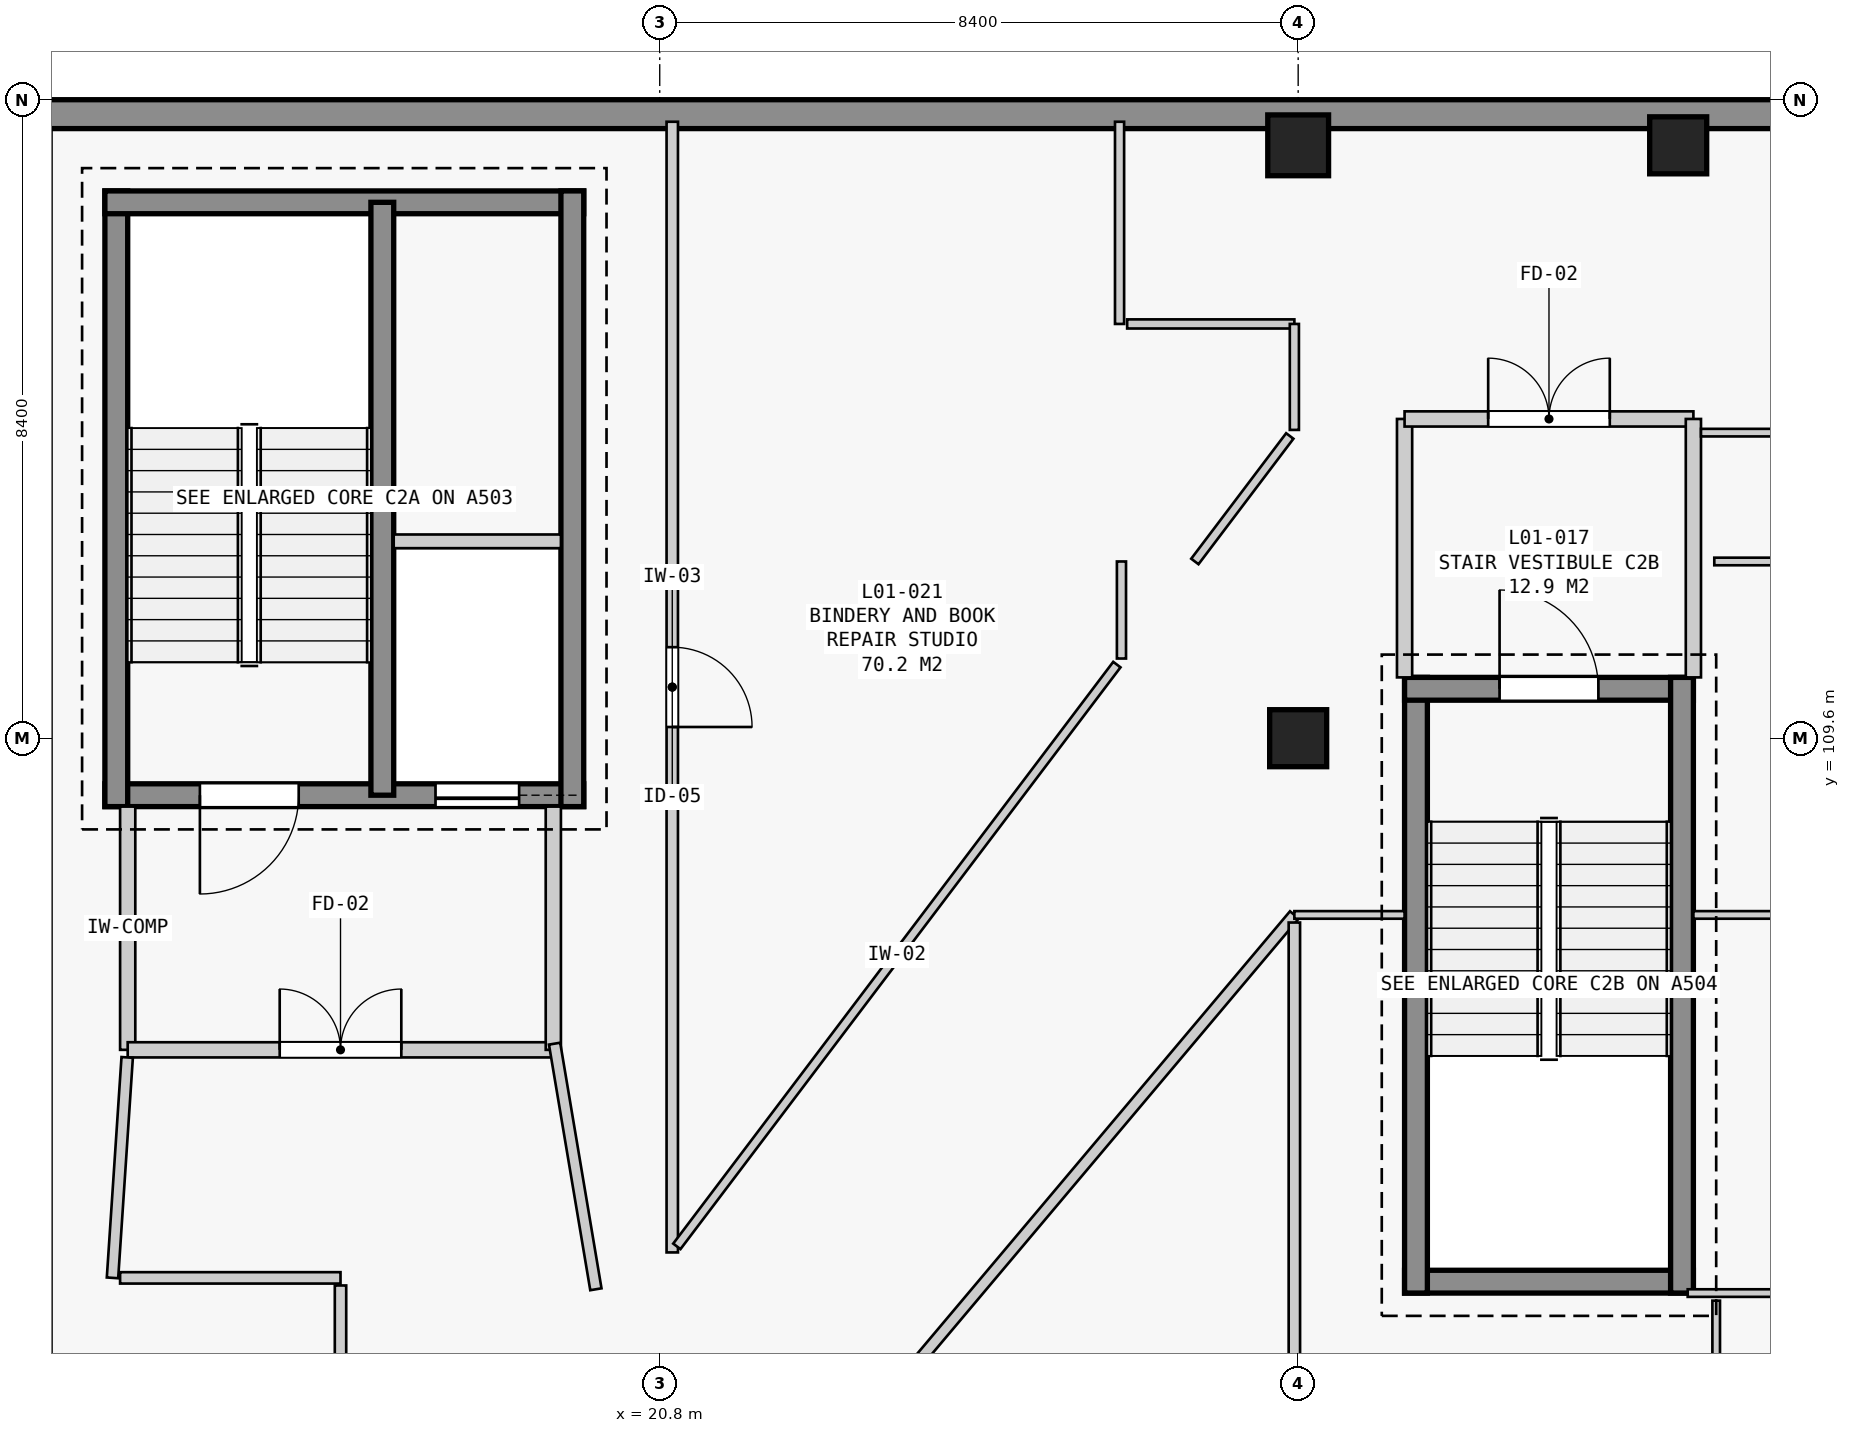
"""IFC4 building model, lengths in metres.
Left out: names, types, materials, properties, quantities, classifications, styles, units other than length and angle.
Written with IfcOpenShell. Run it as: python <this file> out.ifc"""

import sys

from ifc_helpers import new_model, si_unit, direction, frame, frame_2d, origin, origin_2d, place, context, subcontext, project, spatial, rectangle, extrude, element, fill, save


model = new_model("IFC4")
c1 = context("Model", 3, precision=1e-05, world=origin(), true_north=direction((0.0, 1.0)))
c2 = subcontext(c1, "Body", "Model", "MODEL_VIEW")
j1 = project(units=[si_unit("LENGTHUNIT", "METRE"), si_unit("PLANEANGLEUNIT", "RADIAN")], contexts=[c1])
p1 = place(None, origin())
s1 = spatial("IfcSite", under=j1, at=p1, CompositionType="ELEMENT")
p2 = place(p1, origin())
s2 = spatial("IfcBuilding", under=s1, at=p2, CompositionType="ELEMENT")
p3 = place(p2, frame((0.0, 0.0, 5.4)))
s3 = spatial("IfcBuildingStorey", under=s2, at=p3, CompositionType="ELEMENT", Elevation=5.4)
p4 = place(p3, frame((29.2, 109.6, 0.0), z_axis=(0.0, 0.0, 1.0), x_axis=(1.0, 0.0, 0.0)))
e1 = element("IfcColumn", 1, at=p4, inside=s3, PredefinedType="COLUMN", context=c2, shape_type="SweptSolid", body=[
    extrude(rectangle(XDim=0.75, YDim=0.75, at=origin_2d()), origin(), (0.0, 0.0, 1.0), 4.2),
])
p5 = place(p3, frame((29.2, 117.4, 0.0), z_axis=(0.0, 0.0, 1.0), x_axis=(1.0, 0.0, 0.0)))
e2 = element("IfcColumn", 2, at=p5, inside=s3, PredefinedType="COLUMN", context=c2, shape_type="SweptSolid", body=[
    extrude(rectangle(XDim=0.8, YDim=0.8, at=origin_2d()), origin(), (0.0, 0.0, 1.0), 4.2),
])
p6 = place(p3, frame((34.2, 117.4, 0.0), z_axis=(0.0, 0.0, 1.0), x_axis=(1.0, 0.0, 0.0)))
e3 = element("IfcColumn", 3, at=p6, inside=s3, PredefinedType="COLUMN", context=c2, shape_type="SweptSolid", body=[
    extrude(rectangle(XDim=0.75, YDim=0.75, at=origin_2d()), origin(), (0.0, 0.0, 1.0), 4.2),
])
p7 = place(p3, frame((12.59, 117.81, 0.0), z_axis=(0.0, 0.0, 1.0), x_axis=(1.0, 0.0, 0.0)))
e4 = element("IfcWall", 4, at=p7, inside=s3, PredefinedType="STANDARD", context=c2, shape_type="SweptSolid", body=[
    extrude(rectangle(XDim=33.12, YDim=0.38, at=frame_2d((16.56, 0.0))), origin(), (0.0, 0.0, 1.0), 3.88),
])
p8 = place(p3, frame((19.8, 108.85, 0.0), z_axis=(0.0, 0.0, 1.0), x_axis=(-1.0, 0.0, 0.0)))
e5 = element("IfcWall", 5, at=p8, inside=s3, PredefinedType="SHEAR", context=c2, shape_type="SweptSolid", body=[
    extrude(rectangle(XDim=6.3, YDim=0.3, at=frame_2d((3.15, 0.0))), origin(), (0.0, 0.0, 1.0), 3.88),
])
p9 = place(p8, frame((3.75, 0.0, 0.0)))
e6 = element("IfcOpeningElement", 6, at=p9, cuts=e5, PredefinedType="OPENING", context=c2, shape_type="SweptSolid", body=[
    extrude(rectangle(XDim=1.3, YDim=2.2, at=frame_2d((0.65, 1.1))), frame((0.0, 0.16, 0.0), z_axis=(0.0, -1.0, 0.0), x_axis=(1.0, 0.0, 0.0)), (0.0, 0.0, 1.0), 0.32),
])
p10 = place(p8, frame((0.85, 0.0, 0.0)))
e7 = element("IfcOpeningElement", 7, at=p10, cuts=e5, PredefinedType="OPENING", context=c2, shape_type="SweptSolid", body=[
    extrude(rectangle(XDim=1.1, YDim=2.15, at=frame_2d((0.55, 1.075))), frame((0.0, 0.16, 0.0), z_axis=(0.0, -1.0, 0.0), x_axis=(1.0, 0.0, 0.0)), (0.0, 0.0, 1.0), 0.32),
])
p11 = place(p3, frame((13.65, 108.7, 0.0), z_axis=(0.0, 0.0, 1.0), x_axis=(0.0, 1.0, 0.0)))
e8 = element("IfcWall", 8, at=p11, inside=s3, PredefinedType="SHEAR", context=c2, shape_type="SweptSolid", body=[
    extrude(rectangle(XDim=8.1, YDim=0.3, at=frame_2d((4.05, 0.0))), origin(), (0.0, 0.0, 1.0), 3.88),
])
p12 = place(p3, frame((13.5, 116.65, 0.0), z_axis=(0.0, 0.0, 1.0), x_axis=(1.0, 0.0, 0.0)))
e9 = element("IfcWall", 9, at=p12, inside=s3, PredefinedType="SHEAR", context=c2, shape_type="SweptSolid", body=[
    extrude(rectangle(XDim=6.3, YDim=0.3, at=frame_2d((3.15, 0.0))), origin(), (0.0, 0.0, 1.0), 3.88),
])
p13 = place(p3, frame((19.65, 116.8, 0.0), z_axis=(0.0, 0.0, 1.0), x_axis=(0.0, -1.0, 0.0)))
e10 = element("IfcWall", 10, at=p13, inside=s3, PredefinedType="SHEAR", context=c2, shape_type="SweptSolid", body=[
    extrude(rectangle(XDim=8.1, YDim=0.3, at=frame_2d((4.05, 0.0))), origin(), (0.0, 0.0, 1.0), 3.88),
])
p14 = place(p3, frame((17.15, 108.85, 0.0), z_axis=(0.0, 0.0, 1.0), x_axis=(0.0, 1.0, 0.0)))
e11 = element("IfcWall", 11, at=p14, inside=s3, PredefinedType="SHEAR", context=c2, shape_type="SweptSolid", body=[
    extrude(rectangle(XDim=7.8, YDim=0.3, at=frame_2d((3.9, 0.0))), origin(), (0.0, 0.0, 1.0), 3.88),
])
p15 = place(p3, frame((17.3, 112.19, 0.0), z_axis=(0.0, 0.0, 1.0), x_axis=(1.0, 0.0, 0.0)))
e12 = element("IfcWall", 12, at=p15, inside=s3, PredefinedType="PARTITIONING", context=c2, shape_type="SweptSolid", body=[
    extrude(rectangle(XDim=2.2, YDim=0.18, at=frame_2d((1.1, 0.0))), origin(), (0.0, 0.0, 1.0), 3.88),
])
p16 = place(p3, frame((13.8, 108.7, 0.0), z_axis=(0.0, 0.0, 1.0), x_axis=(0.0, -1.0, 0.0)))
e13 = element("IfcWall", 13, at=p16, inside=s3, PredefinedType="STANDARD", context=c2, shape_type="SweptSolid", body=[
    extrude(rectangle(XDim=3.2, YDim=0.2, at=frame_2d((1.6, 0.0))), origin(), (0.0, 0.0, 1.0), 3.88),
])
p17 = place(p3, frame((13.8, 105.5, 0.0), z_axis=(0.0, 0.0, 1.0), x_axis=(1.0, 0.0, 0.0)))
e14 = element("IfcWall", 14, at=p17, inside=s3, PredefinedType="STANDARD", context=c2, shape_type="SweptSolid", body=[
    extrude(rectangle(XDim=5.6, YDim=0.2, at=frame_2d((2.8, 0.0))), origin(), (0.0, 0.0, 1.0), 3.88),
])
p18 = place(p17, frame((2.0, 0.0, 0.0)))
e15 = element("IfcOpeningElement", 15, at=p18, cuts=e14, PredefinedType="OPENING", context=c2, shape_type="SweptSolid", body=[
    extrude(rectangle(XDim=1.6, YDim=2.2, at=frame_2d((0.8, 1.1))), frame((0.0, 0.11, 0.0), z_axis=(0.0, -1.0, 0.0), x_axis=(1.0, 0.0, 0.0)), (0.0, 0.0, 1.0), 0.22),
])
p19 = place(p3, frame((19.4, 105.5, 0.0), z_axis=(0.0, 0.0, 1.0), x_axis=(0.0, 1.0, 0.0)))
e16 = element("IfcWall", 16, at=p19, inside=s3, PredefinedType="STANDARD", context=c2, shape_type="SweptSolid", body=[
    extrude(rectangle(XDim=3.2, YDim=0.2, at=frame_2d((1.6, 0.0))), origin(), (0.0, 0.0, 1.0), 3.88),
])
p20 = place(p3, frame((34.4, 102.45, 0.0), z_axis=(0.0, 0.0, 1.0), x_axis=(-1.0, 0.0, 0.0)))
e17 = element("IfcWall", 17, at=p20, inside=s3, PredefinedType="SHEAR", context=c2, shape_type="SweptSolid", body=[
    extrude(rectangle(XDim=3.8, YDim=0.3, at=frame_2d((1.9, 0.0))), origin(), (0.0, 0.0, 1.0), 3.88),
])
p21 = place(p3, frame((30.75, 102.3, 0.0), z_axis=(0.0, 0.0, 1.0), x_axis=(0.0, 1.0, 0.0)))
e18 = element("IfcWall", 18, at=p21, inside=s3, PredefinedType="SHEAR", context=c2, shape_type="SweptSolid", body=[
    extrude(rectangle(XDim=8.1, YDim=0.3, at=frame_2d((4.05, 0.0))), origin(), (0.0, 0.0, 1.0), 3.88),
])
p22 = place(p3, frame((30.6, 110.25, 0.0), z_axis=(0.0, 0.0, 1.0), x_axis=(1.0, 0.0, 0.0)))
e19 = element("IfcWall", 19, at=p22, inside=s3, PredefinedType="SHEAR", context=c2, shape_type="SweptSolid", body=[
    extrude(rectangle(XDim=3.8, YDim=0.3, at=frame_2d((1.9, 0.0))), origin(), (0.0, 0.0, 1.0), 3.88),
])
p23 = place(p22, frame((1.25, 0.0, 0.0)))
e20 = element("IfcOpeningElement", 20, at=p23, cuts=e19, PredefinedType="OPENING", context=c2, shape_type="SweptSolid", body=[
    extrude(rectangle(XDim=1.3, YDim=2.2, at=frame_2d((0.65, 1.1))), frame((0.0, 0.16, 0.0), z_axis=(0.0, -1.0, 0.0), x_axis=(1.0, 0.0, 0.0)), (0.0, 0.0, 1.0), 0.32),
])
p24 = place(p3, frame((34.25, 110.4, 0.0), z_axis=(0.0, 0.0, 1.0), x_axis=(0.0, -1.0, 0.0)))
e21 = element("IfcWall", 21, at=p24, inside=s3, PredefinedType="SHEAR", context=c2, shape_type="SweptSolid", body=[
    extrude(rectangle(XDim=8.1, YDim=0.3, at=frame_2d((4.05, 0.0))), origin(), (0.0, 0.0, 1.0), 3.88),
])
p25 = place(p3, frame((30.6, 110.4, 0.0), z_axis=(0.0, 0.0, 1.0), x_axis=(0.0, 1.0, 0.0)))
e22 = element("IfcWall", 22, at=p25, inside=s3, PredefinedType="STANDARD", context=c2, shape_type="SweptSolid", body=[
    extrude(rectangle(XDim=3.4, YDim=0.2, at=frame_2d((1.7, 0.0))), origin(), (0.0, 0.0, 1.0), 3.88),
])
p26 = place(p3, frame((30.6, 113.8, 0.0), z_axis=(0.0, 0.0, 1.0), x_axis=(1.0, 0.0, 0.0)))
e23 = element("IfcWall", 23, at=p26, inside=s3, PredefinedType="STANDARD", context=c2, shape_type="SweptSolid", body=[
    extrude(rectangle(XDim=3.8, YDim=0.2, at=frame_2d((1.9, 0.0))), origin(), (0.0, 0.0, 1.0), 3.88),
])
p27 = place(p26, frame((1.1, 0.0, 0.0)))
e24 = element("IfcOpeningElement", 24, at=p27, cuts=e23, PredefinedType="OPENING", context=c2, shape_type="SweptSolid", body=[
    extrude(rectangle(XDim=1.6, YDim=2.2, at=frame_2d((0.8, 1.1))), frame((0.0, 0.11, 0.0), z_axis=(0.0, -1.0, 0.0), x_axis=(1.0, 0.0, 0.0)), (0.0, 0.0, 1.0), 0.22),
])
p28 = place(p3, frame((34.4, 113.8, 0.0), z_axis=(0.0, 0.0, 1.0), x_axis=(0.0, -1.0, 0.0)))
e25 = element("IfcWall", 25, at=p28, inside=s3, PredefinedType="STANDARD", context=c2, shape_type="SweptSolid", body=[
    extrude(rectangle(XDim=3.4, YDim=0.2, at=frame_2d((1.7, 0.0))), origin(), (0.0, 0.0, 1.0), 3.88),
])
p29 = place(p3, frame((20.965, 117.71, 0.0), z_axis=(0.0, 0.0, 1.0), x_axis=(0.0, -1.0, 0.0)))
e26 = element("IfcWall", 26, at=p29, inside=s3, PredefinedType="PARTITIONING", context=c2, shape_type="SweptSolid", body=[
    extrude(rectangle(XDim=14.875, YDim=0.15, at=frame_2d((7.438, 0.0))), origin(), (0.0, 0.0, 1.0), 3.88),
])
p30 = place(p29, frame((6.913, 0.0, 0.0)))
e27 = element("IfcOpeningElement", 27, at=p30, cuts=e26, PredefinedType="OPENING", context=c2, shape_type="SweptSolid", body=[
    extrude(rectangle(XDim=1.05, YDim=2.15, at=frame_2d((0.525, 1.075))), frame((0.0, 0.085, 0.0), z_axis=(0.0, -1.0, 0.0), x_axis=(1.0, 0.0, 0.0)), (0.0, 0.0, 1.0), 0.17),
])
p31 = place(p3, frame((19.96, 102.35, 0.0), z_axis=(0.0, 0.0, 1.0), x_axis=(-0.165860827568, 0.986149170196, 0.0)))
e28 = element("IfcWall", 28, at=p31, inside=s3, PredefinedType="PARTITIONING", context=c2, shape_type="SweptSolid", body=[
    extrude(rectangle(XDim=3.277, YDim=0.15, at=frame_2d((1.638, 0.0))), origin(), (0.0, 0.0, 1.0), 3.88),
])
p32 = place(p3, frame((13.793, 105.4, 0.0), z_axis=(0.0, 0.0, 1.0), x_axis=(-0.066440960793, -0.997790358106, 0.0)))
e29 = element("IfcWall", 29, at=p32, inside=s3, PredefinedType="PARTITIONING", context=c2, shape_type="SweptSolid", body=[
    extrude(rectangle(XDim=2.906, YDim=0.15, at=frame_2d((1.453, 0.0))), origin(), (0.0, 0.0, 1.0), 3.88),
])
p33 = place(p3, frame((13.7, 102.5, 0.0), z_axis=(0.0, 0.0, 1.0), x_axis=(1.0, 0.0, 0.0)))
e30 = element("IfcWall", 30, at=p33, inside=s3, PredefinedType="PARTITIONING", context=c2, shape_type="SweptSolid", body=[
    extrude(rectangle(XDim=2.9, YDim=0.15, at=frame_2d((1.45, 0.0))), origin(), (0.0, 0.0, 1.0), 3.88),
])
p34 = place(p3, frame((16.6, 102.4, 0.0), z_axis=(0.0, 0.0, 1.0), x_axis=(0.0, -1.0, 0.0)))
e31 = element("IfcWall", 31, at=p34, inside=s3, PredefinedType="PARTITIONING", context=c2, shape_type="SweptSolid", body=[
    extrude(rectangle(XDim=5.9, YDim=0.15, at=frame_2d((2.95, 0.0))), origin(), (0.0, 0.0, 1.0), 3.01),
])
p35 = place(p3, frame((23.214, 100.23, 0.0), z_axis=(0.0, 0.0, 1.0), x_axis=(0.644325065347, 0.764751731065, 0.0)))
e32 = element("IfcWall", 32, at=p35, inside=s3, PredefinedType="PARTITIONING", context=c2, shape_type="SweptSolid", body=[
    extrude(rectangle(XDim=9.212, YDim=0.15, at=frame_2d((4.606, 0.0))), origin(), (0.0, 0.0, 1.0), 2.96),
])
p36 = place(p3, frame((29.15, 107.175, 0.0), z_axis=(0.0, 0.0, 1.0), x_axis=(0.0, -1.0, 0.0)))
e33 = element("IfcWall", 33, at=p36, inside=s3, PredefinedType="PARTITIONING", context=c2, shape_type="SweptSolid", body=[
    extrude(rectangle(XDim=30.785, YDim=0.15, at=frame_2d((15.393, 0.0))), origin(), (0.0, 0.0, 1.0), 3.02),
])
p37 = place(p36, frame((14.143, 0.0, 0.0)))
e34 = element("IfcOpeningElement", 34, at=p37, cuts=e33, PredefinedType="OPENING", context=c2, shape_type="SweptSolid", body=[
    extrude(rectangle(XDim=1.1, YDim=2.15, at=frame_2d((0.55, 1.075))), frame((0.0, 0.085, 0.0), z_axis=(0.0, -1.0, 0.0), x_axis=(1.0, 0.0, 0.0)), (0.0, 0.0, 1.0), 0.17),
])
p38 = place(p3, frame((26.85, 117.71, 0.0), z_axis=(0.0, 0.0, 1.0), x_axis=(0.0, -1.0, 0.0)))
e35 = element("IfcWall", 35, at=p38, inside=s3, PredefinedType="PARTITIONING", context=c2, shape_type="SweptSolid", body=[
    extrude(rectangle(XDim=2.66, YDim=0.12, at=frame_2d((1.33, 0.0))), origin(), (0.0, 0.0, 1.0), 3.88),
])
p39 = place(p3, frame((26.95, 115.05, 0.0), z_axis=(0.0, 0.0, 1.0), x_axis=(1.0, 0.0, 0.0)))
e36 = element("IfcWall", 36, at=p39, inside=s3, PredefinedType="PARTITIONING", context=c2, shape_type="SweptSolid", body=[
    extrude(rectangle(XDim=2.2, YDim=0.12, at=frame_2d((1.1, 0.0))), origin(), (0.0, 0.0, 1.0), 3.01),
])
p40 = place(p3, frame((29.15, 115.05, 0.0), z_axis=(0.0, 0.0, 1.0), x_axis=(0.0, -1.0, 0.0)))
e37 = element("IfcWall", 37, at=p40, inside=s3, PredefinedType="PARTITIONING", context=c2, shape_type="SweptSolid", body=[
    extrude(rectangle(XDim=1.394, YDim=0.12, at=frame_2d((0.697, 0.0))), origin(), (0.0, 0.0, 1.0), 3.01),
])
p41 = place(p3, frame((29.09, 113.576, 0.0), z_axis=(0.0, 0.0, 1.0), x_axis=(-0.603221736947, -0.7975735302, 0.0)))
e38 = element("IfcWall", 38, at=p41, inside=s3, PredefinedType="PARTITIONING", context=c2, shape_type="SweptSolid", body=[
    extrude(rectangle(XDim=2.07, YDim=0.12, at=frame_2d((1.035, 0.0))), origin(), (0.0, 0.0, 1.0), 3.01),
])
p42 = place(p3, frame((26.875, 111.925, 0.0), z_axis=(0.0, 0.0, 1.0), x_axis=(0.0, -1.0, 0.0)))
e39 = element("IfcWall", 39, at=p42, inside=s3, PredefinedType="PARTITIONING", context=c2, shape_type="SweptSolid", body=[
    extrude(rectangle(XDim=1.277, YDim=0.12, at=frame_2d((0.638, 0.0))), origin(), (0.0, 0.0, 1.0), 3.88),
])
p43 = place(p3, frame((26.815, 110.568, 0.0), z_axis=(0.0, 0.0, 1.0), x_axis=(-0.603259469492, -0.797544990874, 0.0)))
e40 = element("IfcWall", 40, at=p43, inside=s3, PredefinedType="PARTITIONING", context=c2, shape_type="SweptSolid", body=[
    extrude(rectangle(XDim=9.597, YDim=0.12, at=frame_2d((4.798, 0.0))), origin(), (0.0, 0.0, 1.0), 3.88),
])
p44 = place(p3, frame((34.5, 113.62, 0.0), z_axis=(0.0, 0.0, 1.0), x_axis=(1.0, 0.0, 0.0)))
e41 = element("IfcWall", 41, at=p44, inside=s3, PredefinedType="PARTITIONING", context=c2, shape_type="SweptSolid", body=[
    extrude(rectangle(XDim=2.835, YDim=0.1, at=frame_2d((1.417, 0.0))), origin(), (0.0, 0.0, 1.0), 3.06),
])
p45 = place(p3, frame((37.235, 111.925, 0.0), z_axis=(0.0, 0.0, 1.0), x_axis=(-1.0, 0.0, 0.0)))
e42 = element("IfcWall", 42, at=p45, inside=s3, PredefinedType="PARTITIONING", context=c2, shape_type="SweptSolid", body=[
    extrude(rectangle(XDim=2.56, YDim=0.1, at=frame_2d((1.28, 0.0))), origin(), (0.0, 0.0, 1.0), 3.06),
])
p46 = place(p3, frame((34.4, 107.275, 0.0), z_axis=(0.0, 0.0, 1.0), x_axis=(1.0, 0.0, 0.0)))
e43 = element("IfcWall", 43, at=p46, inside=s3, PredefinedType="PARTITIONING", context=c2, shape_type="SweptSolid", body=[
    extrude(rectangle(XDim=2.935, YDim=0.1, at=frame_2d((1.468, 0.0))), origin(), (0.0, 0.0, 1.0), 3.01),
])
p47 = place(p3, frame((37.235, 102.3, 0.0), z_axis=(0.0, 0.0, 1.0), x_axis=(-1.0, 0.0, 0.0)))
e44 = element("IfcWall", 44, at=p47, inside=s3, PredefinedType="PARTITIONING", context=c2, shape_type="SweptSolid", body=[
    extrude(rectangle(XDim=2.91, YDim=0.1, at=frame_2d((1.455, 0.0))), origin(), (0.0, 0.0, 1.0), 3.01),
])
p48 = place(p3, frame((34.7, 102.2, 0.0), z_axis=(0.0, 0.0, 1.0), x_axis=(0.0, -1.0, 0.0)))
e45 = element("IfcWall", 45, at=p48, inside=s3, PredefinedType="PARTITIONING", context=c2, shape_type="SweptSolid", body=[
    extrude(rectangle(XDim=4.5, YDim=0.1, at=frame_2d((2.25, 0.0))), origin(), (0.0, 0.0, 1.0), 3.11),
])
p49 = place(p3, frame((29.15, 107.275, 0.0), z_axis=(0.0, 0.0, 1.0), x_axis=(1.0, 0.0, 0.0)))
e46 = element("IfcWall", 46, at=p49, inside=s3, PredefinedType="PARTITIONING", context=c2, shape_type="SweptSolid", body=[
    extrude(rectangle(XDim=1.45, YDim=0.1, at=frame_2d((0.725, 0.0))), origin(), (0.0, 0.0, 1.0), 3.06),
])
p50 = place(p9, origin())
e47 = element("IfcDoor", 47, at=p50, inside=s3, OperationType="SINGLE_SWING_RIGHT", PredefinedType="DOOR", context=c2, shape_type="SweptSolid", body=[
    extrude(rectangle(XDim=1.3, YDim=2.2, at=frame_2d((0.65, 1.1))), frame((0.0, 0.025, 0.0), z_axis=(0.0, -1.0, 0.0), x_axis=(1.0, 0.0, 0.0)), (0.0, 0.0, 1.0), 0.05),
])
fill(e6, e47)
p51 = place(p10, origin())
e48 = element("IfcDoor", 48, at=p51, inside=s3, OperationType="SLIDING_TO_LEFT", PredefinedType="DOOR", context=c2, shape_type="SweptSolid", body=[
    extrude(rectangle(XDim=1.1, YDim=2.15, at=frame_2d((0.55, 1.075))), frame((0.0, 0.025, 0.0), z_axis=(0.0, -1.0, 0.0), x_axis=(1.0, 0.0, 0.0)), (0.0, 0.0, 1.0), 0.05),
])
fill(e7, e48)
p52 = place(p23, origin())
e49 = element("IfcDoor", 49, at=p52, inside=s3, OperationType="SINGLE_SWING_LEFT", PredefinedType="DOOR", context=c2, shape_type="SweptSolid", body=[
    extrude(rectangle(XDim=1.3, YDim=2.2, at=frame_2d((0.65, 1.1))), frame((0.0, 0.025, 0.0), z_axis=(0.0, -1.0, 0.0), x_axis=(1.0, 0.0, 0.0)), (0.0, 0.0, 1.0), 0.05),
])
fill(e20, e49)
p53 = place(p18, origin())
e50 = element("IfcDoor", 50, at=p53, inside=s3, OperationType="DOUBLE_DOOR_SINGLE_SWING", PredefinedType="DOOR", context=c2, shape_type="SweptSolid", body=[
    extrude(rectangle(XDim=1.6, YDim=2.2, at=frame_2d((0.8, 1.1))), frame((0.0, 0.025, 0.0), z_axis=(0.0, -1.0, 0.0), x_axis=(1.0, 0.0, 0.0)), (0.0, 0.0, 1.0), 0.05),
])
fill(e15, e50)
p54 = place(p27, origin())
e51 = element("IfcDoor", 51, at=p54, inside=s3, OperationType="DOUBLE_DOOR_SINGLE_SWING", PredefinedType="DOOR", context=c2, shape_type="SweptSolid", body=[
    extrude(rectangle(XDim=1.6, YDim=2.2, at=frame_2d((0.8, 1.1))), frame((0.0, 0.025, 0.0), z_axis=(0.0, -1.0, 0.0), x_axis=(1.0, 0.0, 0.0)), (0.0, 0.0, 1.0), 0.05),
])
fill(e24, e51)
p55 = place(p30, origin())
e52 = element("IfcDoor", 52, at=p55, inside=s3, OperationType="SINGLE_SWING_RIGHT", PredefinedType="DOOR", context=c2, shape_type="SweptSolid", body=[
    extrude(rectangle(XDim=1.05, YDim=2.15, at=frame_2d((0.525, 1.075))), frame((0.0, 0.025, 0.0), z_axis=(0.0, -1.0, 0.0), x_axis=(1.0, 0.0, 0.0)), (0.0, 0.0, 1.0), 0.05),
])
fill(e27, e52)
save(model, sys.argv[1])
